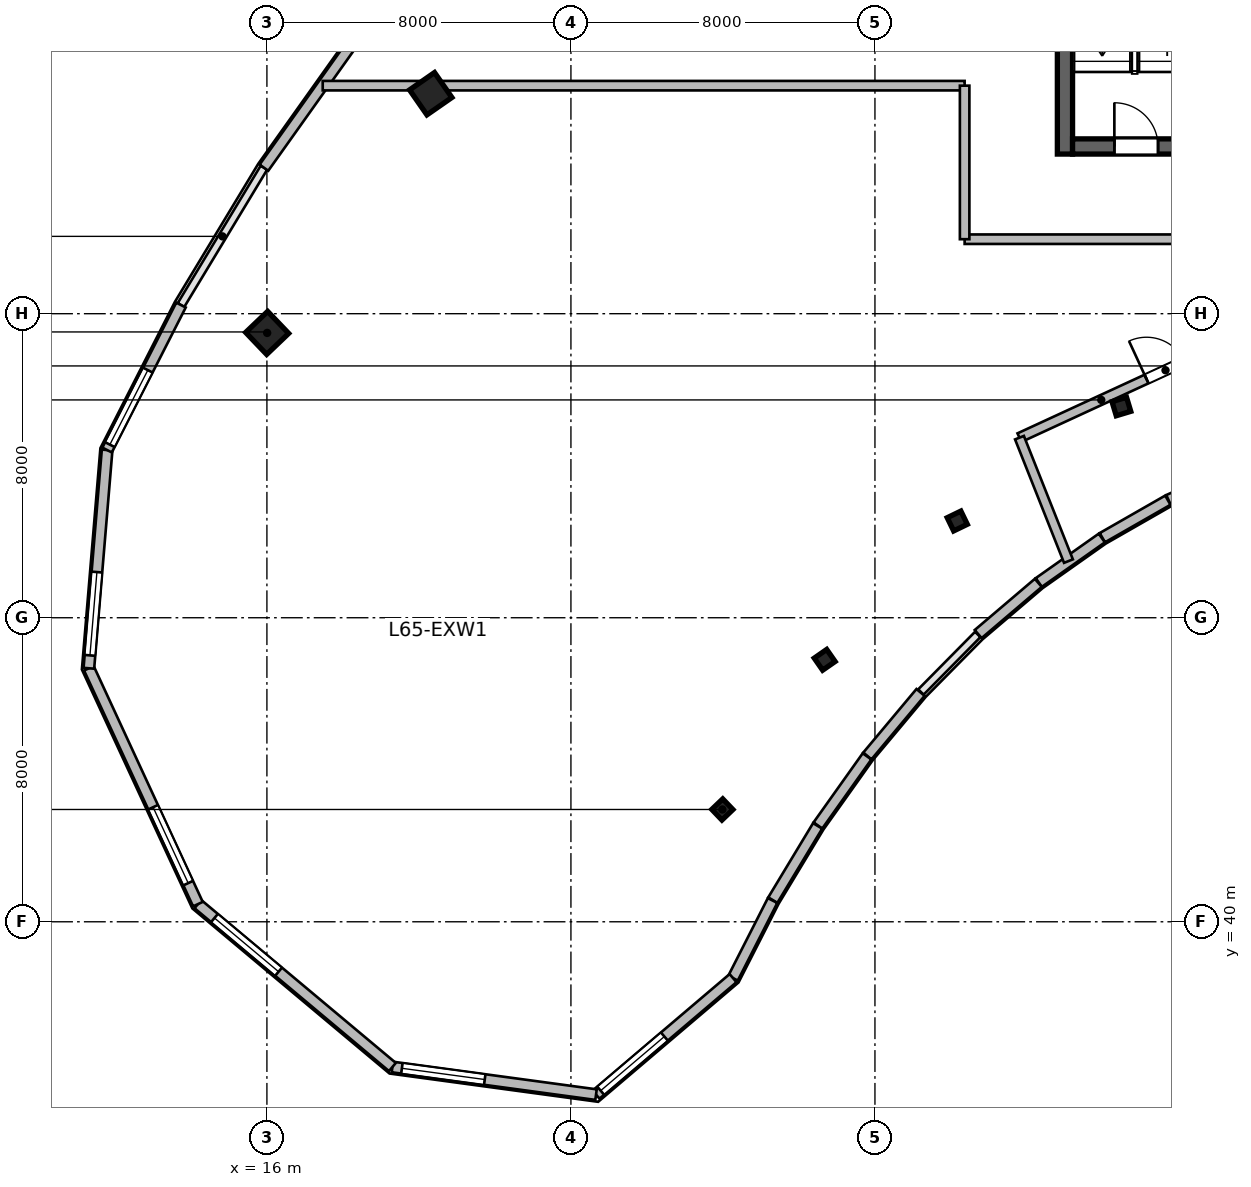
"""IFC4 building model, lengths in metres.
Left out: names, types, materials, properties, quantities, classifications, styles, units other than length and angle.
Written with IfcOpenShell. Run it as: python <this file> out.ifc"""

import sys

from ifc_helpers import new_model, si_unit, direction, frame, frame_2d, origin, origin_2d, place, context, subcontext, project, spatial, rectangle, i_section, extrude, source, transform, mapped, element, fill, save


model = new_model("IFC4")
c1 = context("Model", 3, precision=1e-05, world=origin(), true_north=direction((0.0, 1.0)))
c2 = subcontext(c1, "Body", "Model", "MODEL_VIEW")
j1 = project(units=[si_unit("LENGTHUNIT", "METRE"), si_unit("PLANEANGLEUNIT", "RADIAN")], contexts=[c1])
p1 = place(None, origin())
s1 = spatial("IfcSite", under=j1, at=p1, CompositionType="ELEMENT")
p2 = place(p1, origin())
s2 = spatial("IfcBuilding", under=s1, at=p2, CompositionType="ELEMENT")
p3 = place(p2, frame((0.0, 0.0, 267.9)))
s3 = spatial("IfcBuildingStorey", under=s2, at=p3, CompositionType="ELEMENT", Elevation=267.9)
m1 = source(origin(), c2, "Body", "SweptSolid", [
    extrude(rectangle(XDim=12.0, YDim=0.4, at=frame_2d((6.0, 0.0))), origin(), (0.0, 0.0, 1.0), 3.9),
])
p4 = place(p3, frame((37.0, 60.2, 0.0), z_axis=(0.0, 0.0, 1.0), x_axis=(0.0, 1.0, 0.0)))
e1 = element("IfcWall", 1, at=p4, inside=s3, PredefinedType="SHEAR", context=c2, shape_type="MappedRepresentation", body=[
    mapped(m1, transform((0.0, 0.0, 0.0), scale=1.0)),
])
m2 = source(origin(), c2, "Body", "SweptSolid", [
    extrude(rectangle(XDim=21.6, YDim=0.4, at=frame_2d((10.8, 0.0))), origin(), (0.0, 0.0, 1.0), 3.9),
])
p5 = place(p3, frame((37.2, 60.4, 0.0), z_axis=(0.0, 0.0, 1.0), x_axis=(1.0, 0.0, 0.0)))
e2 = element("IfcWall", 2, at=p5, inside=s3, PredefinedType="SHEAR", context=c2, shape_type="MappedRepresentation", body=[
    mapped(m2, transform((0.0, 0.0, 0.0), scale=1.0)),
])
p6 = place(p5, frame((1.1, 0.0, 0.0)))
e3 = element("IfcOpeningElement", 3, at=p6, cuts=e2, PredefinedType="OPENING", context=c2, shape_type="SweptSolid", body=[
    extrude(rectangle(XDim=1.15, YDim=2.15, at=frame_2d((0.575, 1.075))), frame((0.0, 0.21, 0.0), z_axis=(0.0, -1.0, 0.0), x_axis=(1.0, 0.0, 0.0)), (0.0, 0.0, 1.0), 0.42),
])
p7 = place(p5, frame((19.5, 0.0, 0.0)))
e4 = element("IfcOpeningElement", 4, at=p7, cuts=e2, PredefinedType="OPENING", context=c2, shape_type="SweptSolid", body=[
    extrude(rectangle(XDim=0.9, YDim=2.1, at=frame_2d((0.45, 1.05))), frame((0.0, 0.21, 0.0), z_axis=(0.0, -1.0, 0.0), x_axis=(1.0, 0.0, 0.0)), (0.0, 0.0, 1.0), 0.42),
])
p8 = place(p5, frame((12.02, 0.0, 0.0)))
e5 = element("IfcOpeningElement", 5, at=p8, cuts=e2, PredefinedType="OPENING", context=c2, shape_type="SweptSolid", body=[
    extrude(rectangle(XDim=1.6, YDim=2.15, at=frame_2d((0.8, 1.075))), frame((0.0, 0.21, 0.0), z_axis=(0.0, -1.0, 0.0), x_axis=(1.0, 0.0, 0.0)), (0.0, 0.0, 1.0), 0.42),
])
m3 = source(origin(), c2, "Body", "SweptSolid", [
    extrude(i_section(OverallWidth=0.399, OverallDepth=0.387, WebThickness=0.021, FlangeThickness=0.033, at=origin_2d()), origin(), (0.0, 0.0, 1.0), 3.9),
])
p9 = place(p3, frame((27.985, 42.955, 0.0), z_axis=(0.0, 0.0, 1.0), x_axis=(-0.690756218984, 0.723087716626, 0.0)))
e6 = element("IfcColumn", 6, at=p9, inside=s3, PredefinedType="COLUMN", context=c2, shape_type="MappedRepresentation", body=[
    mapped(m3, transform((0.0, 0.0, 0.0), scale=1.0)),
])
m4 = source(origin(), c2, "Body", "SweptSolid", [
    extrude(rectangle(XDim=0.8, YDim=0.8, at=origin_2d()), origin(), (0.0, 0.0, 1.0), 3.9),
])
p10 = place(p3, frame((16.007, 55.494, 0.0), z_axis=(0.0, 0.0, 1.0), x_axis=(-0.690756218984, 0.723087716626, 0.0)))
e7 = element("IfcColumn", 7, at=p10, inside=s3, PredefinedType="COLUMN", context=c2, shape_type="MappedRepresentation", body=[
    mapped(m4, transform((0.0, 0.0, 0.0), scale=1.0)),
])
p11 = place(p3, frame((30.677, 46.892, 0.0), z_axis=(0.0, 0.0, 1.0), x_axis=(-0.571143442153, 0.820850271661, 0.0)))
e8 = element("IfcColumn", 8, at=p11, inside=s3, PredefinedType="COLUMN", context=c2, shape_type="MappedRepresentation", body=[
    mapped(m3, transform((0.0, 0.0, 0.0), scale=1.0)),
])
p12 = place(p3, frame((20.311, 61.789, 0.0), z_axis=(0.0, 0.0, 1.0), x_axis=(-0.571143442153, 0.820850271661, 0.0)))
e9 = element("IfcColumn", 9, at=p12, inside=s3, PredefinedType="COLUMN", context=c2, shape_type="MappedRepresentation", body=[
    mapped(m4, transform((0.0, 0.0, 0.0), scale=1.0)),
])
for number, where, z_axis, x_axis in (
    (10, (34.166, 50.545, 0.0), (0.0, 0.0, 1.0), (-0.436, 0.9, 0.0)),
    (11, (38.485, 53.558, 0.0), (0.0, 0.0, 1.0), (-0.289, 0.957, 0.0)),
):
    element("IfcColumn", number, at=place(p3, frame(where, z_axis=z_axis, x_axis=x_axis)), inside=s3, PredefinedType="COLUMN", context=c2, shape_type="MappedRepresentation", body=[
        mapped(m3, transform((0.0, 0.0, 0.0), scale=1.0)),
    ])
m5 = source(origin(), c2, "Body", "SweptSolid", [
    extrude(rectangle(XDim=1.948, YDim=0.28, at=frame_2d((0.974, 0.0))), origin(), (0.0, 0.0, 1.0), 3.65),
])
p13 = place(p3, frame((41.501, 51.897, 0.0), z_axis=(0.0, 0.0, 1.0), x_axis=(-0.912712483043, -0.408602402461, 0.0)))
e12 = element("IfcWall", 12, at=p13, inside=s3, PredefinedType="SOLIDWALL", context=c2, shape_type="MappedRepresentation", body=[
    mapped(m5, transform((0.0, 0.0, 0.0), scale=1.0)),
])
m6 = source(origin(), c2, "Body", "SweptSolid", [
    extrude(rectangle(XDim=1.986, YDim=0.28, at=frame_2d((0.993, 0.0))), origin(), (0.0, 0.0, 1.0), 3.65),
])
p14 = place(p3, frame((39.708, 51.093, 0.0), z_axis=(0.0, 0.0, 1.0), x_axis=(-0.867940364671, -0.496668423976, 0.0)))
e13 = element("IfcWall", 13, at=p14, inside=s3, PredefinedType="SOLIDWALL", context=c2, shape_type="MappedRepresentation", body=[
    mapped(m6, transform((0.0, 0.0, 0.0), scale=1.0)),
])
m7 = source(origin(), c2, "Body", "SweptSolid", [
    extrude(rectangle(XDim=2.03, YDim=0.28, at=frame_2d((1.015, 0.0))), origin(), (0.0, 0.0, 1.0), 3.65),
])
p15 = place(p3, frame((37.969, 50.097, 0.0), z_axis=(0.0, 0.0, 1.0), x_axis=(-0.816987864272, -0.576654861796, 0.0)))
e14 = element("IfcWall", 14, at=p15, inside=s3, PredefinedType="SOLIDWALL", context=c2, shape_type="MappedRepresentation", body=[
    mapped(m7, transform((0.0, 0.0, 0.0), scale=1.0)),
])
m8 = source(origin(), c2, "Body", "SweptSolid", [
    extrude(rectangle(XDim=2.078, YDim=0.28, at=frame_2d((1.039, 0.0))), origin(), (0.0, 0.0, 1.0), 3.65),
])
p16 = place(p3, frame((36.298, 48.917, 0.0), z_axis=(0.0, 0.0, 1.0), x_axis=(-0.761475215802, -0.648194026291, 0.0)))
e15 = element("IfcWall", 15, at=p16, inside=s3, PredefinedType="SOLIDWALL", context=c2, shape_type="MappedRepresentation", body=[
    mapped(m8, transform((0.0, 0.0, 0.0), scale=1.0)),
])
m9 = source(origin(), c2, "Body", "SweptSolid", [
    extrude(rectangle(XDim=2.18, YDim=0.28, at=frame_2d((1.09, 0.0))), origin(), (0.0, 0.0, 1.0), 3.65),
])
p17 = place(p3, frame((33.2, 46.035, 0.0), z_axis=(0.0, 0.0, 1.0), x_axis=(-0.641835571889, -0.766842290603, 0.0)))
e16 = element("IfcWall", 16, at=p17, inside=s3, PredefinedType="SOLIDWALL", context=c2, shape_type="MappedRepresentation", body=[
    mapped(m9, transform((0.0, 0.0, 0.0), scale=1.0)),
])
m10 = source(origin(), c2, "Body", "SweptSolid", [
    extrude(rectangle(XDim=2.231, YDim=0.28, at=frame_2d((1.116, 0.0))), origin(), (0.0, 0.0, 1.0), 3.65),
])
p18 = place(p3, frame((31.792, 44.352, 0.0), z_axis=(0.0, 0.0, 1.0), x_axis=(-0.579622296598, -0.814885263879, 0.0)))
e17 = element("IfcWall", 17, at=p18, inside=s3, PredefinedType="SOLIDWALL", context=c2, shape_type="MappedRepresentation", body=[
    mapped(m10, transform((0.0, 0.0, 0.0), scale=1.0)),
])
m11 = source(origin(), c2, "Body", "SweptSolid", [
    extrude(rectangle(XDim=2.281, YDim=0.28, at=frame_2d((1.14, 0.0))), origin(), (0.0, 0.0, 1.0), 3.65),
])
p19 = place(p3, frame((30.492, 42.523, 0.0), z_axis=(0.0, 0.0, 1.0), x_axis=(-0.516917942662, -0.856034952881, 0.0)))
e18 = element("IfcWall", 18, at=p19, inside=s3, PredefinedType="SOLIDWALL", context=c2, shape_type="MappedRepresentation", body=[
    mapped(m11, transform((0.0, 0.0, 0.0), scale=1.0)),
])
m12 = source(origin(), c2, "Body", "SweptSolid", [
    extrude(rectangle(XDim=2.292, YDim=0.28, at=frame_2d((1.146, 0.0))), origin(), (0.0, 0.0, 1.0), 3.65),
])
p20 = place(p3, frame((29.306, 40.559, 0.0), z_axis=(0.0, 0.0, 1.0), x_axis=(-0.453933760778, -0.891035431858, 0.0)))
e19 = element("IfcWall", 19, at=p20, inside=s3, PredefinedType="SOLIDWALL", context=c2, shape_type="MappedRepresentation", body=[
    mapped(m12, transform((0.0, 0.0, 0.0), scale=1.0)),
])
m13 = source(origin(), c2, "Body", "SweptSolid", [
    extrude(rectangle(XDim=4.732, YDim=0.28, at=frame_2d((2.366, 0.0))), origin(), (0.0, 0.0, 1.0), 3.65),
])
p21 = place(p3, frame((28.266, 38.517, 0.0), z_axis=(0.0, 0.0, 1.0), x_axis=(-0.761912583238, -0.647679871158, 0.0)))
e20 = element("IfcWall", 20, at=p21, inside=s3, PredefinedType="SOLIDWALL", context=c2, shape_type="MappedRepresentation", body=[
    mapped(m13, transform((0.0, 0.0, 0.0), scale=1.0)),
])
p22 = place(p21, frame((2.372, 0.0, 0.95)))
e21 = element("IfcOpeningElement", 21, at=p22, cuts=e20, PredefinedType="OPENING", context=c2, shape_type="SweptSolid", body=[
    extrude(rectangle(XDim=2.2, YDim=2.1, at=frame_2d((1.1, 1.05))), frame((0.0, 0.15, 0.0), z_axis=(0.0, -1.0, 0.0), x_axis=(1.0, 0.0, 0.0)), (0.0, 0.0, 1.0), 0.3),
])
m14 = source(origin(), c2, "Body", "SweptSolid", [
    extrude(rectangle(XDim=5.408, YDim=0.28, at=frame_2d((2.704, 0.0))), origin(), (0.0, 0.0, 1.0), 3.65),
])
p23 = place(p3, frame((24.661, 35.452, 0.0), z_axis=(0.0, 0.0, 1.0), x_axis=(-0.990932903229, 0.134357661853, 0.0)))
e22 = element("IfcWall", 22, at=p23, inside=s3, PredefinedType="SOLIDWALL", context=c2, shape_type="MappedRepresentation", body=[
    mapped(m14, transform((0.0, 0.0, 0.0), scale=1.0)),
])
p24 = place(p23, frame((2.956, 0.0, 0.95)))
e23 = element("IfcOpeningElement", 23, at=p24, cuts=e22, PredefinedType="OPENING", context=c2, shape_type="SweptSolid", body=[
    extrude(rectangle(XDim=2.2, YDim=2.1, at=frame_2d((1.1, 1.05))), frame((0.0, 0.15, 0.0), z_axis=(0.0, -1.0, 0.0), x_axis=(1.0, 0.0, 0.0)), (0.0, 0.0, 1.0), 0.3),
])
m15 = source(origin(), c2, "Body", "SweptSolid", [
    extrude(rectangle(XDim=6.675, YDim=0.28, at=frame_2d((3.338, 0.0))), origin(), (0.0, 0.0, 1.0), 3.65),
])
p25 = place(p3, frame((19.302, 36.179, 0.0), z_axis=(0.0, 0.0, 1.0), x_axis=(-0.766726273546, 0.641974159491, 0.0)))
e24 = element("IfcWall", 24, at=p25, inside=s3, PredefinedType="SOLIDWALL", context=c2, shape_type="MappedRepresentation", body=[
    mapped(m15, transform((0.0, 0.0, 0.0), scale=1.0)),
])
p26 = place(p25, frame((3.906, 0.0, 0.95)))
e25 = element("IfcOpeningElement", 25, at=p26, cuts=e24, PredefinedType="OPENING", context=c2, shape_type="SweptSolid", body=[
    extrude(rectangle(XDim=2.2, YDim=2.1, at=frame_2d((1.1, 1.05))), frame((0.0, 0.15, 0.0), z_axis=(0.0, -1.0, 0.0), x_axis=(1.0, 0.0, 0.0)), (0.0, 0.0, 1.0), 0.3),
])
m16 = source(origin(), c2, "Body", "SweptSolid", [
    extrude(rectangle(XDim=6.837, YDim=0.28, at=frame_2d((3.418, 0.0))), origin(), (0.0, 0.0, 1.0), 3.65),
])
p27 = place(p3, frame((14.184, 40.464, 0.0), z_axis=(0.0, 0.0, 1.0), x_axis=(-0.419621957862, 0.907698965781, 0.0)))
e26 = element("IfcWall", 26, at=p27, inside=s3, PredefinedType="SOLIDWALL", context=c2, shape_type="MappedRepresentation", body=[
    mapped(m16, transform((0.0, 0.0, 0.0), scale=1.0)),
])
p28 = place(p27, frame((0.609, 0.0, 0.95)))
e27 = element("IfcOpeningElement", 27, at=p28, cuts=e26, PredefinedType="OPENING", context=c2, shape_type="SweptSolid", body=[
    extrude(rectangle(XDim=2.2, YDim=2.1, at=frame_2d((1.1, 1.05))), frame((0.0, 0.15, 0.0), z_axis=(0.0, -1.0, 0.0), x_axis=(1.0, 0.0, 0.0)), (0.0, 0.0, 1.0), 0.3),
])
m17 = source(origin(), c2, "Body", "SweptSolid", [
    extrude(rectangle(XDim=5.763, YDim=0.28, at=frame_2d((2.881, 0.0))), origin(), (0.0, 0.0, 1.0), 3.65),
])
p29 = place(p3, frame((11.315, 46.67, 0.0), z_axis=(0.0, 0.0, 1.0), x_axis=(0.083290906041, 0.996525275631, 0.0)))
e28 = element("IfcWall", 28, at=p29, inside=s3, PredefinedType="SOLIDWALL", context=c2, shape_type="MappedRepresentation", body=[
    mapped(m17, transform((0.0, 0.0, 0.0), scale=1.0)),
])
p30 = place(p29, frame((0.341, 0.0, 0.95)))
e29 = element("IfcOpeningElement", 29, at=p30, cuts=e28, PredefinedType="OPENING", context=c2, shape_type="SweptSolid", body=[
    extrude(rectangle(XDim=2.2, YDim=2.1, at=frame_2d((1.1, 1.05))), frame((0.0, 0.15, 0.0), z_axis=(0.0, -1.0, 0.0), x_axis=(1.0, 0.0, 0.0)), (0.0, 0.0, 1.0), 0.3),
])
m18 = source(origin(), c2, "Body", "SweptSolid", [
    extrude(rectangle(XDim=4.281, YDim=0.28, at=frame_2d((2.141, 0.0))), origin(), (0.0, 0.0, 1.0), 3.65),
])
p31 = place(p3, frame((11.795, 52.413, 0.0), z_axis=(0.0, 0.0, 1.0), x_axis=(0.454020597637, 0.890991187903, 0.0)))
e30 = element("IfcWall", 30, at=p31, inside=s3, PredefinedType="SOLIDWALL", context=c2, shape_type="MappedRepresentation", body=[
    mapped(m18, transform((0.0, 0.0, 0.0), scale=1.0)),
])
p32 = place(p31, frame((0.16, 0.0, 0.95)))
e31 = element("IfcOpeningElement", 31, at=p32, cuts=e30, PredefinedType="OPENING", context=c2, shape_type="SweptSolid", body=[
    extrude(rectangle(XDim=2.2, YDim=2.1, at=frame_2d((1.1, 1.05))), frame((0.0, 0.15, 0.0), z_axis=(0.0, -1.0, 0.0), x_axis=(1.0, 0.0, 0.0)), (0.0, 0.0, 1.0), 0.3),
])
m19 = source(origin(), c2, "Body", "SweptSolid", [
    extrude(rectangle(XDim=4.129, YDim=0.28, at=frame_2d((2.065, 0.0))), origin(), (0.0, 0.0, 1.0), 3.65),
])
p33 = place(p3, frame((15.921, 59.842, 0.0), z_axis=(0.0, 0.0, 1.0), x_axis=(0.57959272029, 0.814906300495, 0.0)))
e32 = element("IfcWall", 32, at=p33, inside=s3, PredefinedType="SOLIDWALL", context=c2, shape_type="MappedRepresentation", body=[
    mapped(m19, transform((0.0, 0.0, 0.0), scale=1.0)),
])
m20 = source(origin(), c2, "Body", "SweptSolid", [
    extrude(rectangle(XDim=8.464, YDim=0.25, at=frame_2d((4.232, 0.0))), origin(), (0.0, 0.0, 1.0), 3.65),
])
p34 = place(p3, frame((35.803, 52.738, 0.0), z_axis=(0.0, 0.0, 1.0), x_axis=(0.90801678306, 0.418933791524, 0.0)))
e33 = element("IfcWall", 33, at=p34, inside=s3, PredefinedType="PARTITIONING", context=c2, shape_type="MappedRepresentation", body=[
    mapped(m20, transform((0.0, 0.0, 0.0), scale=1.0)),
])
p35 = place(p34, frame((3.682, 0.0, 0.0)))
e34 = element("IfcOpeningElement", 34, at=p35, cuts=e33, PredefinedType="OPENING", context=c2, shape_type="SweptSolid", body=[
    extrude(rectangle(XDim=1.1, YDim=2.15, at=frame_2d((0.55, 1.075))), frame((0.0, 0.135, 0.0), z_axis=(0.0, -1.0, 0.0), x_axis=(1.0, 0.0, 0.0)), (0.0, 0.0, 1.0), 0.27),
])
m21 = source(origin(), c2, "Body", "SweptSolid", [
    extrude(rectangle(XDim=3.495, YDim=0.25, at=frame_2d((1.747, 0.0))), origin(), (0.0, 0.0, 1.0), 3.65),
])
p36 = place(p3, frame((37.092, 49.49, 0.0), z_axis=(0.0, 0.0, 1.0), x_axis=(-0.368859890644, 0.929485008526, 0.0)))
e35 = element("IfcWall", 35, at=p36, inside=s3, PredefinedType="PARTITIONING", context=c2, shape_type="MappedRepresentation", body=[
    mapped(m21, transform((0.0, 0.0, 0.0), scale=1.0)),
])
m22 = source(origin(), c2, "Body", "SweptSolid", [
    extrude(rectangle(XDim=12.39, YDim=0.25, at=frame_2d((6.195, 0.0))), origin(), (0.0, 0.0, 1.0), 3.65),
])
p37 = place(p3, frame((34.36, 57.96, 0.0), z_axis=(0.0, 0.0, 1.0), x_axis=(1.0, 0.0, 0.0)))
e36 = element("IfcWall", 36, at=p37, inside=s3, PredefinedType="PARTITIONING", context=c2, shape_type="MappedRepresentation", body=[
    mapped(m22, transform((0.0, 0.0, 0.0), scale=1.0)),
])
m23 = source(origin(), c2, "Body", "SweptSolid", [
    extrude(rectangle(XDim=16.892, YDim=0.25, at=frame_2d((8.446, 0.0))), origin(), (0.0, 0.0, 1.0), 3.65),
])
p38 = place(p3, frame((17.469, 62.0, 0.0), z_axis=(0.0, 0.0, 1.0), x_axis=(1.0, 0.0, 0.0)))
e37 = element("IfcWall", 37, at=p38, inside=s3, PredefinedType="PARTITIONING", context=c2, shape_type="MappedRepresentation", body=[
    mapped(m23, transform((0.0, 0.0, 0.0), scale=1.0)),
])
m24 = source(origin(), c2, "Body", "SweptSolid", [
    extrude(rectangle(XDim=4.04, YDim=0.25, at=frame_2d((2.02, 0.0))), origin(), (0.0, 0.0, 1.0), 3.65),
])
p39 = place(p3, frame((34.36, 57.96, 0.0), z_axis=(0.0, 0.0, 1.0), x_axis=(0.0, 1.0, 0.0)))
e38 = element("IfcWall", 38, at=p39, inside=s3, PredefinedType="PARTITIONING", context=c2, shape_type="MappedRepresentation", body=[
    mapped(m24, transform((0.0, 0.0, 0.0), scale=1.0)),
])
m25 = source(origin(), c2, "Body", "SweptSolid", [
    extrude(rectangle(XDim=2.2, YDim=2.1, at=frame_2d((1.1, 1.05))), frame((0.0, 0.03, 0.0), z_axis=(0.0, -1.0, 0.0), x_axis=(1.0, 0.0, 0.0)), (0.0, 0.0, 1.0), 0.06),
])
p40 = place(p22, origin())
e39 = element("IfcWindow", 39, at=p40, inside=s3, PartitioningType="TRIPLE_PANEL_VERTICAL", PredefinedType="WINDOW", context=c2, shape_type="MappedRepresentation", body=[
    mapped(m25, transform((0.0, 0.0, 0.0), scale=1.0)),
])
fill(e21, e39)
p41 = place(p24, origin())
e40 = element("IfcWindow", 40, at=p41, inside=s3, PartitioningType="TRIPLE_PANEL_VERTICAL", PredefinedType="WINDOW", context=c2, shape_type="MappedRepresentation", body=[
    mapped(m25, transform((0.0, 0.0, 0.0), scale=1.0)),
])
fill(e23, e40)
p42 = place(p26, origin())
e41 = element("IfcWindow", 41, at=p42, inside=s3, PartitioningType="TRIPLE_PANEL_VERTICAL", PredefinedType="WINDOW", context=c2, shape_type="MappedRepresentation", body=[
    mapped(m25, transform((0.0, 0.0, 0.0), scale=1.0)),
])
fill(e25, e41)
p43 = place(p28, origin())
e42 = element("IfcWindow", 42, at=p43, inside=s3, PartitioningType="TRIPLE_PANEL_VERTICAL", PredefinedType="WINDOW", context=c2, shape_type="MappedRepresentation", body=[
    mapped(m25, transform((0.0, 0.0, 0.0), scale=1.0)),
])
fill(e27, e42)
p44 = place(p30, origin())
e43 = element("IfcWindow", 43, at=p44, inside=s3, PartitioningType="TRIPLE_PANEL_VERTICAL", PredefinedType="WINDOW", context=c2, shape_type="MappedRepresentation", body=[
    mapped(m25, transform((0.0, 0.0, 0.0), scale=1.0)),
])
fill(e29, e43)
p45 = place(p32, origin())
e44 = element("IfcWindow", 44, at=p45, inside=s3, PartitioningType="TRIPLE_PANEL_VERTICAL", PredefinedType="WINDOW", context=c2, shape_type="MappedRepresentation", body=[
    mapped(m25, transform((0.0, 0.0, 0.0), scale=1.0)),
])
fill(e31, e44)
m26 = source(origin(), c2, "Body", "SweptSolid", [
    extrude(rectangle(XDim=1.15, YDim=2.15, at=frame_2d((0.575, 1.075))), frame((0.0, 0.025, 0.0), z_axis=(0.0, -1.0, 0.0), x_axis=(1.0, 0.0, 0.0)), (0.0, 0.0, 1.0), 0.05),
])
p46 = place(p6, origin())
e45 = element("IfcDoor", 45, at=p46, inside=s3, OperationType="SINGLE_SWING_LEFT", PredefinedType="DOOR", context=c2, shape_type="MappedRepresentation", body=[
    mapped(m26, transform((0.0, 0.0, 0.0), scale=1.0)),
])
fill(e3, e45)
m27 = source(origin(), c2, "Body", "SweptSolid", [
    extrude(rectangle(XDim=1.1, YDim=2.15, at=frame_2d((0.55, 1.075))), frame((0.0, 0.025, 0.0), z_axis=(0.0, -1.0, 0.0), x_axis=(1.0, 0.0, 0.0)), (0.0, 0.0, 1.0), 0.05),
])
p47 = place(p35, origin())
e46 = element("IfcDoor", 46, at=p47, inside=s3, OperationType="SINGLE_SWING_LEFT", PredefinedType="DOOR", context=c2, shape_type="MappedRepresentation", body=[
    mapped(m27, transform((0.0, 0.0, 0.0), scale=1.0)),
])
fill(e34, e46)
save(model, sys.argv[1])
